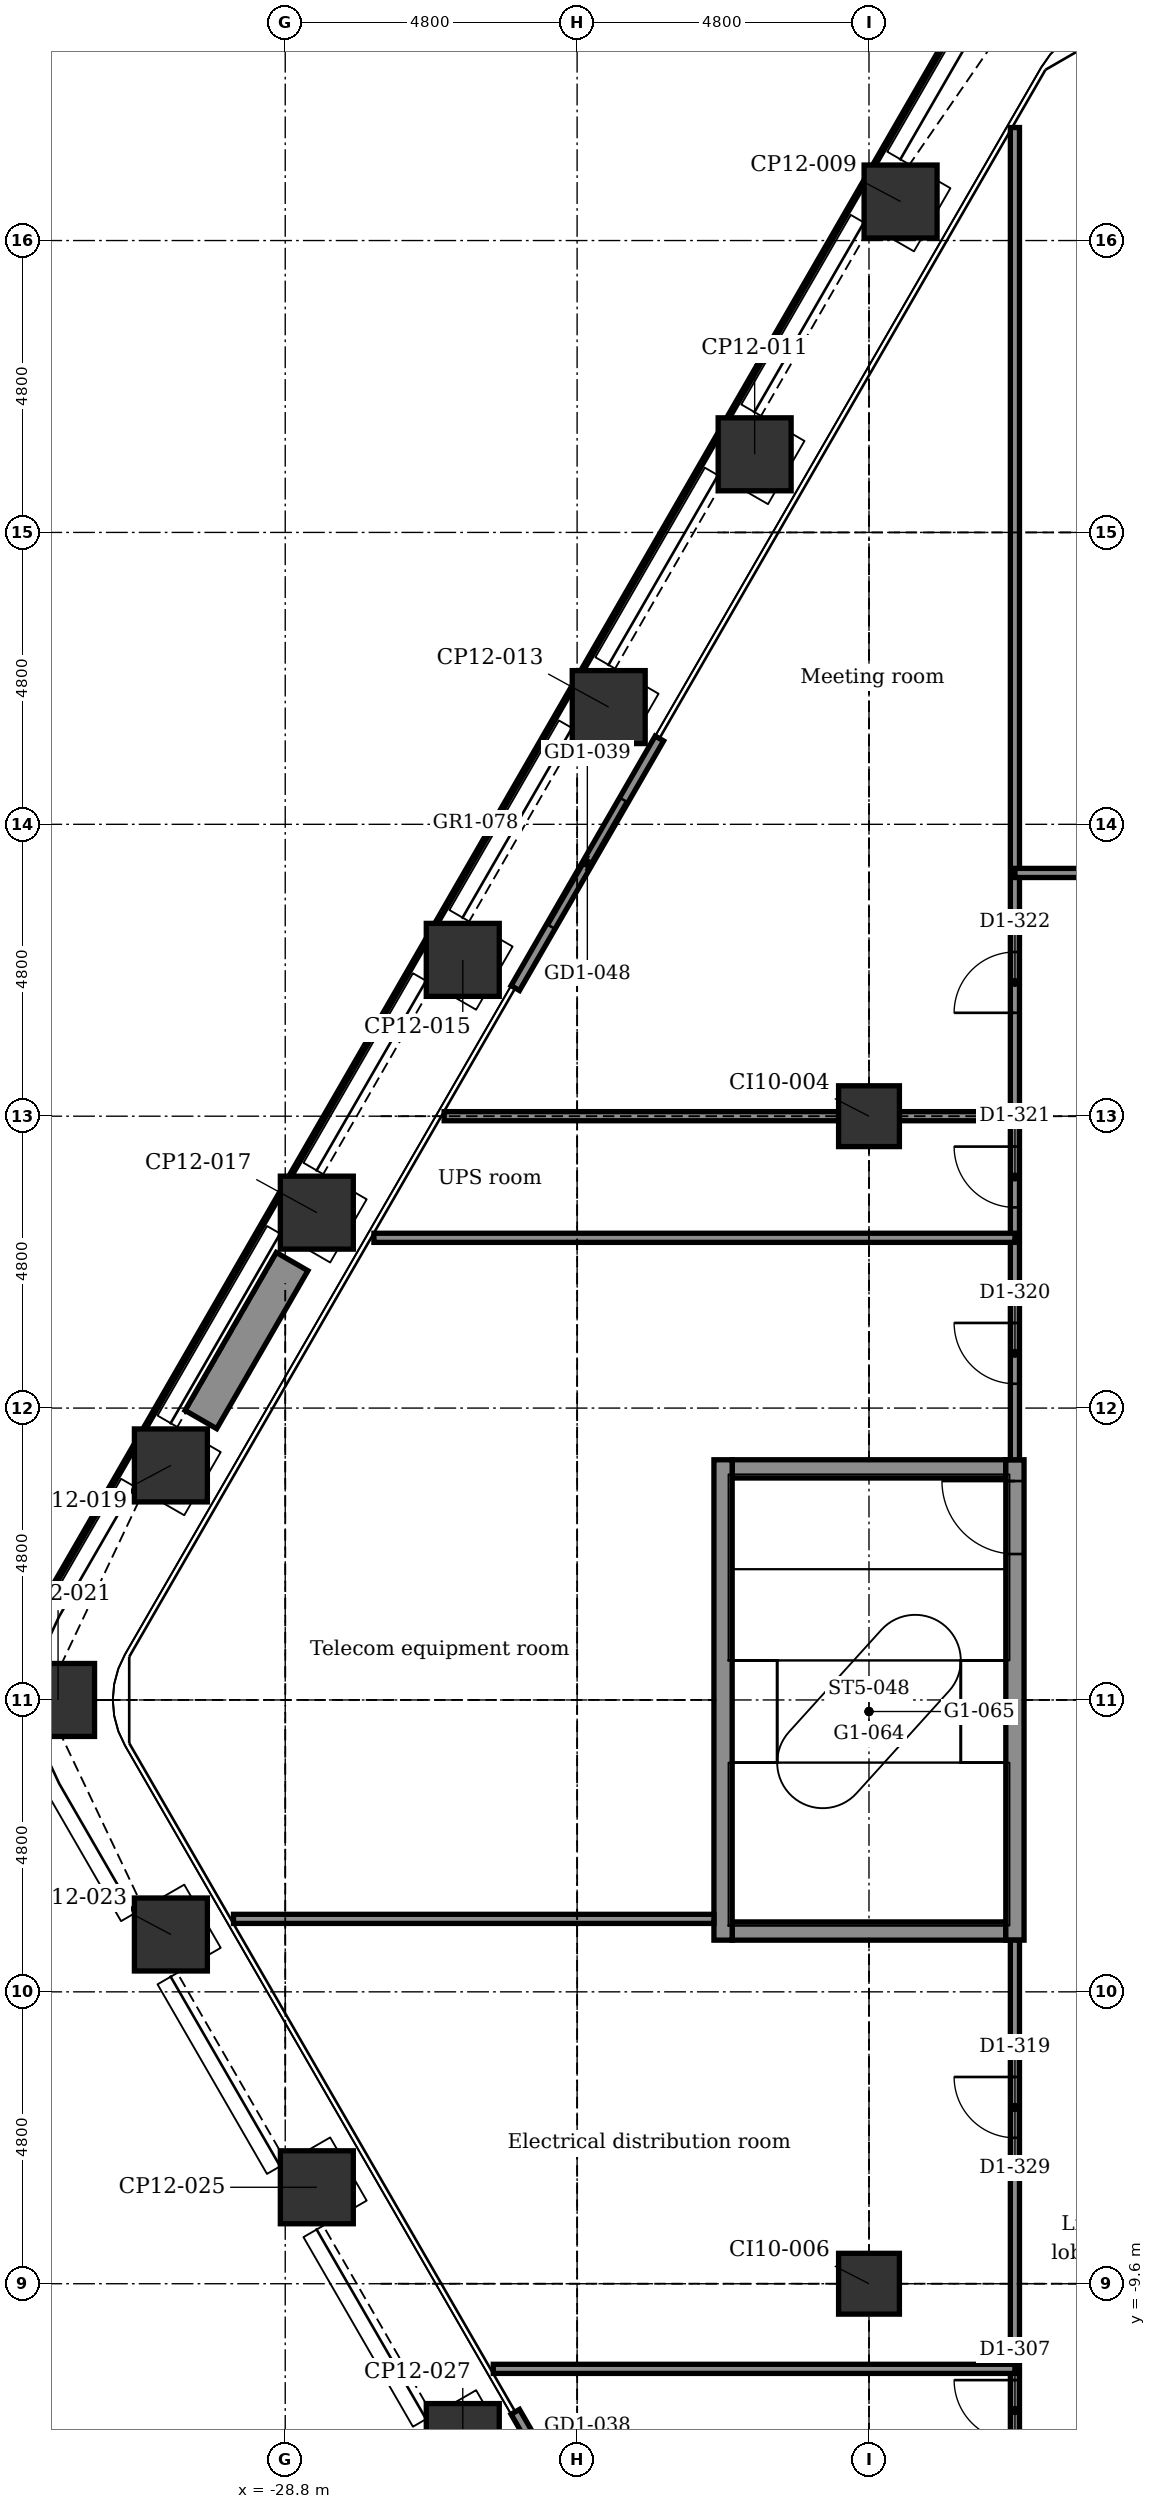
"""IFC4 building model, lengths in metres.
Left out: names, types, materials, properties, quantities, classifications, styles, units other than length and angle.
Written with IfcOpenShell. Run it as: python <this file> out.ifc"""

import sys

from ifc_helpers import new_model, si_unit, direction, frame, frame_2d, origin, origin_2d, place, context, subcontext, project, spatial, rectangle, extrude, element, fill, save


model = new_model("IFC4")
c1 = context("Model", 3, precision=1e-05, world=origin(), true_north=direction((0.0, 1.0)))
c2 = subcontext(c1, "Body", "Model", "MODEL_VIEW")
j1 = project(units=[si_unit("LENGTHUNIT", "METRE"), si_unit("PLANEANGLEUNIT", "RADIAN")], contexts=[c1])
p1 = place(None, origin())
s1 = spatial("IfcSite", under=j1, at=p1, CompositionType="ELEMENT")
p2 = place(p1, origin())
s2 = spatial("IfcBuilding", under=s1, at=p2, CompositionType="ELEMENT")
p3 = place(p2, frame((0.0, 0.0, 113.9)))
s3 = spatial("IfcBuildingStorey", under=s2, at=p3, CompositionType="ELEMENT", Elevation=113.9)
for number, where, z_axis, x_axis in (
    (1, (-25.88, -12.171, -0.2), (0.0, 0.0, 1.0), (0.866, 0.5, 0.0)),
    (2, (-28.28, -8.014, -0.2), (0.0, 0.0, 1.0), (0.866, 0.5, 0.0)),
    (3, (-30.68, -3.857, -0.2), (0.0, 0.0, 1.0), (0.866, 0.5, 0.0)),
    (4, (-32.536, 0.0, -0.2), (0.0, 0.0, 1.0), (1.0, 0.0, 0.0)),
    (5, (-30.68, 3.857, -0.2), (0.0, 0.0, 1.0), (0.5, 0.866, 0.0)),
    (6, (-28.28, 8.014, -0.2), (0.0, 0.0, 1.0), (0.5, 0.866, 0.0)),
    (7, (-25.88, 12.171, -0.2), (0.0, 0.0, 1.0), (0.5, 0.866, 0.0)),
    (8, (-23.48, 16.328, -0.2), (0.0, 0.0, 1.0), (0.5, 0.866, 0.0)),
    (9, (-21.08, 20.485, -0.2), (0.0, 0.0, 1.0), (0.5, 0.866, 0.0)),
    (10, (-18.68, 24.642, -0.2), (0.0, 0.0, 1.0), (0.5, 0.866, 0.0)),
):
    element("IfcColumn", number, at=place(p3, frame(where, z_axis=z_axis, x_axis=x_axis)), inside=s3, PredefinedType="COLUMN", context=c2, shape_type="SweptSolid", body=[
        extrude(rectangle(XDim=1.2, YDim=1.2, at=origin_2d()), origin(), (0.0, 0.0, 1.0), 4.5),
    ])
for number, where, z_axis, x_axis in (
    (11, (-19.2, -9.6, -0.2), (0.0, 0.0, 1.0), (1.0, 0.0, 0.0)),
    (12, (-19.2, 9.6, -0.2), (0.0, 0.0, 1.0), (1.0, 0.0, 0.0)),
):
    element("IfcColumn", number, at=place(p3, frame(where, z_axis=z_axis, x_axis=x_axis)), inside=s3, PredefinedType="COLUMN", context=c2, shape_type="SweptSolid", body=[
        extrude(rectangle(XDim=1.0, YDim=1.0, at=origin_2d()), origin(), (0.0, 0.0, 1.0), 4.5),
    ])
for number, where, z_axis, x_axis in (
    (13, (-21.45, -3.8, -0.2), (0.0, 0.0, 1.0), (1.0, 0.0, 0.0)),
    (14, (-21.45, 3.8, -0.2), (0.0, 0.0, 1.0), (1.0, 0.0, 0.0)),
):
    element("IfcWall", number, at=place(p3, frame(where, z_axis=z_axis, x_axis=x_axis)), inside=s3, PredefinedType="STANDARD", context=c2, shape_type="SweptSolid", body=[
        extrude(rectangle(XDim=4.5, YDim=0.3, at=frame_2d((2.25, 0.0))), origin(), (0.0, 0.0, 1.0), 4.5),
    ])
p4 = place(p3, frame((-21.6, -3.95, -0.2), z_axis=(0.0, 0.0, 1.0), x_axis=(0.0, 1.0, 0.0)))
e15 = element("IfcWall", 15, at=p4, inside=s3, PredefinedType="STANDARD", context=c2, shape_type="SweptSolid", body=[
    extrude(rectangle(XDim=7.9, YDim=0.3, at=frame_2d((3.95, 0.0))), origin(), (0.0, 0.0, 1.0), 4.5),
])
p5 = place(p3, frame((-16.8, -3.95, -0.2), z_axis=(0.0, 0.0, 1.0), x_axis=(0.0, 1.0, 0.0)))
e16 = element("IfcWall", 16, at=p5, inside=s3, PredefinedType="STANDARD", context=c2, shape_type="SweptSolid", body=[
    extrude(rectangle(XDim=7.9, YDim=0.3, at=frame_2d((3.95, 0.0))), origin(), (0.0, 0.0, 1.0), 4.5),
])
p6 = place(p5, frame((6.35, 0.0, 0.2)))
e17 = element("IfcOpeningElement", 17, at=p6, cuts=e16, PredefinedType="OPENING", context=c2, shape_type="SweptSolid", body=[
    extrude(rectangle(XDim=1.2, YDim=2.1, at=frame_2d((0.6, 1.05))), frame((0.0, 0.16, 0.0), z_axis=(0.0, -1.0, 0.0), x_axis=(1.0, 0.0, 0.0)), (0.0, 0.0, 1.0), 0.32),
])
p7 = place(p3, frame((-22.647, -15.812, 0.0), z_axis=(0.0, 0.0, 1.0), x_axis=(-0.499978080042, 0.866038058908, 0.0)))
e18 = element("IfcWall", 18, at=p7, inside=s3, PredefinedType="PARTITIONING", context=c2, shape_type="SweptSolid", body=[
    extrude(rectangle(XDim=4.74, YDim=0.16, at=frame_2d((2.37, 0.0))), origin(), (0.0, 0.0, 1.0), 4.3),
])
p8 = place(p7, frame((1.17, 0.0, 0.0)))
e19 = element("IfcOpeningElement", 19, at=p8, cuts=e18, PredefinedType="OPENING", context=c2, shape_type="SweptSolid", body=[
    extrude(rectangle(XDim=2.4, YDim=2.4, at=frame_2d((1.2, 1.2))), frame((0.0, 0.09, 0.0), z_axis=(0.0, -1.0, 0.0), x_axis=(1.0, 0.0, 0.0)), (0.0, 0.0, 1.0), 0.18),
])
p9 = place(p3, frame((-25.017, 11.707, 0.0), z_axis=(0.0, 0.0, 1.0), x_axis=(0.499978080042, 0.866038058908, 0.0)))
e20 = element("IfcWall", 20, at=p9, inside=s3, PredefinedType="PARTITIONING", context=c2, shape_type="SweptSolid", body=[
    extrude(rectangle(XDim=4.74, YDim=0.16, at=frame_2d((2.37, 0.0))), origin(), (0.0, 0.0, 1.0), 4.3),
])
p10 = place(p9, frame((1.17, 0.0, 0.0)))
e21 = element("IfcOpeningElement", 21, at=p10, cuts=e20, PredefinedType="OPENING", context=c2, shape_type="SweptSolid", body=[
    extrude(rectangle(XDim=2.4, YDim=2.4, at=frame_2d((1.2, 1.2))), frame((0.0, 0.09, 0.0), z_axis=(0.0, -1.0, 0.0), x_axis=(1.0, 0.0, 0.0)), (0.0, 0.0, 1.0), 0.18),
])
p11 = place(p3, frame((-30.187, 4.611, 0.0), z_axis=(0.0, 0.0, 1.0), x_axis=(0.499990139034, 0.866031096941, 0.0)))
e22 = element("IfcWall", 22, at=p11, inside=s3, PredefinedType="USERDEFINED", context=c2, shape_type="SweptSolid", body=[
    extrude(rectangle(XDim=3.0, YDim=0.6, at=frame_2d((1.5, 0.0))), origin(), (0.0, 0.0, 1.0), 0.7),
])
p12 = place(p3, frame((-16.8, -12.4, 0.0), z_axis=(0.0, 0.0, 1.0), x_axis=(0.0, 1.0, 0.0)))
e23 = element("IfcWall", 23, at=p12, inside=s3, PredefinedType="PARTITIONING", context=c2, shape_type="SweptSolid", body=[
    extrude(rectangle(XDim=8.45, YDim=0.15, at=frame_2d((4.225, 0.0))), origin(), (0.0, 0.0, 1.0), 4.3),
])
p13 = place(p12, frame((0.215, 0.0, 0.0)))
e24 = element("IfcOpeningElement", 24, at=p13, cuts=e23, PredefinedType="OPENING", context=c2, shape_type="SweptSolid", body=[
    extrude(rectangle(XDim=1.0, YDim=2.1, at=frame_2d((0.5, 1.05))), frame((0.0, 0.085, 0.0), z_axis=(0.0, -1.0, 0.0), x_axis=(1.0, 0.0, 0.0)), (0.0, 0.0, 1.0), 0.17),
])
p14 = place(p12, frame((5.2, 0.0, 0.0)))
e25 = element("IfcOpeningElement", 25, at=p14, cuts=e23, PredefinedType="OPENING", context=c2, shape_type="SweptSolid", body=[
    extrude(rectangle(XDim=1.0, YDim=2.1, at=frame_2d((0.5, 1.05))), frame((0.0, 0.085, 0.0), z_axis=(0.0, -1.0, 0.0), x_axis=(1.0, 0.0, 0.0)), (0.0, 0.0, 1.0), 0.17),
])
p15 = place(p3, frame((-16.8, 3.95, 0.0), z_axis=(0.0, 0.0, 1.0), x_axis=(0.0, 1.0, 0.0)))
e26 = element("IfcWall", 26, at=p15, inside=s3, PredefinedType="PARTITIONING", context=c2, shape_type="SweptSolid", body=[
    extrude(rectangle(XDim=21.908, YDim=0.15, at=frame_2d((10.954, 0.0))), origin(), (0.0, 0.0, 1.0), 4.3),
])
p16 = place(p15, frame((1.25, 0.0, 0.0)))
e27 = element("IfcOpeningElement", 27, at=p16, cuts=e26, PredefinedType="OPENING", context=c2, shape_type="SweptSolid", body=[
    extrude(rectangle(XDim=1.0, YDim=2.1, at=frame_2d((0.5, 1.05))), frame((0.0, 0.085, 0.0), z_axis=(0.0, -1.0, 0.0), x_axis=(1.0, 0.0, 0.0)), (0.0, 0.0, 1.0), 0.17),
])
p17 = place(p15, frame((4.15, 0.0, 0.0)))
e28 = element("IfcOpeningElement", 28, at=p17, cuts=e26, PredefinedType="OPENING", context=c2, shape_type="SweptSolid", body=[
    extrude(rectangle(XDim=1.0, YDim=2.1, at=frame_2d((0.5, 1.05))), frame((0.0, 0.085, 0.0), z_axis=(0.0, -1.0, 0.0), x_axis=(1.0, 0.0, 0.0)), (0.0, 0.0, 1.0), 0.17),
])
p18 = place(p15, frame((7.35, 0.0, 0.0)))
e29 = element("IfcOpeningElement", 29, at=p18, cuts=e26, PredefinedType="OPENING", context=c2, shape_type="SweptSolid", body=[
    extrude(rectangle(XDim=1.0, YDim=2.1, at=frame_2d((0.5, 1.05))), frame((0.0, 0.085, 0.0), z_axis=(0.0, -1.0, 0.0), x_axis=(1.0, 0.0, 0.0)), (0.0, 0.0, 1.0), 0.17),
])
p19 = place(p3, frame((-25.378, -11.0, 0.0), z_axis=(0.0, 0.0, 1.0), x_axis=(1.0, 0.0, 0.0)))
e30 = element("IfcWall", 30, at=p19, inside=s3, PredefinedType="PARTITIONING", context=c2, shape_type="SweptSolid", body=[
    extrude(rectangle(XDim=8.578, YDim=0.15, at=frame_2d((4.289, 0.0))), origin(), (0.0, 0.0, 1.0), 4.3),
])
p20 = place(p3, frame((-29.651, -3.6, 0.0), z_axis=(0.0, 0.0, 1.0), x_axis=(1.0, 0.0, 0.0)))
e31 = element("IfcWall", 31, at=p20, inside=s3, PredefinedType="PARTITIONING", context=c2, shape_type="SweptSolid", body=[
    extrude(rectangle(XDim=7.901, YDim=0.15, at=frame_2d((3.95, 0.0))), origin(), (0.0, 0.0, 1.0), 4.3),
])
p21 = place(p3, frame((-27.342, 7.6, 0.0), z_axis=(0.0, 0.0, 1.0), x_axis=(1.0, 0.0, 0.0)))
e32 = element("IfcWall", 32, at=p21, inside=s3, PredefinedType="PARTITIONING", context=c2, shape_type="SweptSolid", body=[
    extrude(rectangle(XDim=10.542, YDim=0.15, at=frame_2d((5.271, 0.0))), origin(), (0.0, 0.0, 1.0), 4.3),
])
p22 = place(p3, frame((-26.187, 9.6, 0.0), z_axis=(0.0, 0.0, 1.0), x_axis=(1.0, 0.0, 0.0)))
e33 = element("IfcWall", 33, at=p22, inside=s3, PredefinedType="PARTITIONING", context=c2, shape_type="SweptSolid", body=[
    extrude(rectangle(XDim=6.487, YDim=0.15, at=frame_2d((3.243, 0.0))), origin(), (0.0, 0.0, 1.0), 3.692),
])
p23 = place(p3, frame((-18.7, 9.6, 0.0), z_axis=(0.0, 0.0, 1.0), x_axis=(1.0, 0.0, 0.0)))
e34 = element("IfcWall", 34, at=p23, inside=s3, PredefinedType="PARTITIONING", context=c2, shape_type="SweptSolid", body=[
    extrude(rectangle(XDim=1.9, YDim=0.15, at=frame_2d((0.95, 0.0))), origin(), (0.0, 0.0, 1.0), 3.692),
])
p24 = place(p3, frame((-16.8, 13.6, 0.0), z_axis=(0.0, 0.0, 1.0), x_axis=(1.0, 0.0, 0.0)))
e35 = element("IfcWall", 35, at=p24, inside=s3, PredefinedType="PARTITIONING", context=c2, shape_type="SweptSolid", body=[
    extrude(rectangle(XDim=33.6, YDim=0.15, at=frame_2d((16.8, 0.0))), origin(), (0.0, 0.0, 1.0), 4.3),
])
p25 = place(p24, frame((3.1, 0.0, 0.0)))
e36 = element("IfcOpeningElement", 36, at=p25, cuts=e35, PredefinedType="OPENING", context=c2, shape_type="SweptSolid", body=[
    extrude(rectangle(XDim=1.0, YDim=2.1, at=frame_2d((0.5, 1.05))), frame((0.0, 0.085, 0.0), z_axis=(0.0, -1.0, 0.0), x_axis=(1.0, 0.0, 0.0)), (0.0, 0.0, 1.0), 0.17),
])
p26 = place(p24, frame((9.1, 0.0, 0.0)))
e37 = element("IfcOpeningElement", 37, at=p26, cuts=e35, PredefinedType="OPENING", context=c2, shape_type="SweptSolid", body=[
    extrude(rectangle(XDim=1.0, YDim=2.1, at=frame_2d((0.5, 1.05))), frame((0.0, 0.085, 0.0), z_axis=(0.0, -1.0, 0.0), x_axis=(1.0, 0.0, 0.0)), (0.0, 0.0, 1.0), 0.17),
])
p27 = place(p24, frame((13.9, 0.0, 0.0)))
e38 = element("IfcOpeningElement", 38, at=p27, cuts=e35, PredefinedType="OPENING", context=c2, shape_type="SweptSolid", body=[
    extrude(rectangle(XDim=1.0, YDim=2.1, at=frame_2d((0.5, 1.05))), frame((0.0, 0.085, 0.0), z_axis=(0.0, -1.0, 0.0), x_axis=(1.0, 0.0, 0.0)), (0.0, 0.0, 1.0), 0.17),
])
p28 = place(p24, frame((18.7, 0.0, 0.0)))
e39 = element("IfcOpeningElement", 39, at=p28, cuts=e35, PredefinedType="OPENING", context=c2, shape_type="SweptSolid", body=[
    extrude(rectangle(XDim=1.0, YDim=2.1, at=frame_2d((0.5, 1.05))), frame((0.0, 0.085, 0.0), z_axis=(0.0, -1.0, 0.0), x_axis=(1.0, 0.0, 0.0)), (0.0, 0.0, 1.0), 0.17),
])
p29 = place(p24, frame((23.5, 0.0, 0.0)))
e40 = element("IfcOpeningElement", 40, at=p29, cuts=e35, PredefinedType="OPENING", context=c2, shape_type="SweptSolid", body=[
    extrude(rectangle(XDim=1.0, YDim=2.1, at=frame_2d((0.5, 1.05))), frame((0.0, 0.085, 0.0), z_axis=(0.0, -1.0, 0.0), x_axis=(1.0, 0.0, 0.0)), (0.0, 0.0, 1.0), 0.17),
])
p30 = place(p24, frame((29.5, 0.0, 0.0)))
e41 = element("IfcOpeningElement", 41, at=p30, cuts=e35, PredefinedType="OPENING", context=c2, shape_type="SweptSolid", body=[
    extrude(rectangle(XDim=1.0, YDim=2.1, at=frame_2d((0.5, 1.05))), frame((0.0, 0.085, 0.0), z_axis=(0.0, -1.0, 0.0), x_axis=(1.0, 0.0, 0.0)), (0.0, 0.0, 1.0), 0.17),
])
p31 = place(p10, origin())
e42 = element("IfcDoor", 42, at=p31, inside=s3, OperationType="DOUBLE_DOOR_SLIDING", PredefinedType="DOOR", context=c2, shape_type="SweptSolid", body=[
    extrude(rectangle(XDim=2.4, YDim=2.4, at=frame_2d((1.2, 1.2))), frame((0.0, 0.025, 0.0), z_axis=(0.0, -1.0, 0.0), x_axis=(1.0, 0.0, 0.0)), (0.0, 0.0, 1.0), 0.05),
])
fill(e21, e42)
p32 = place(p13, origin())
e43 = element("IfcDoor", 43, at=p32, inside=s3, OperationType="SINGLE_SWING_RIGHT", PredefinedType="DOOR", context=c2, shape_type="SweptSolid", body=[
    extrude(rectangle(XDim=1.0, YDim=2.1, at=frame_2d((0.5, 1.05))), frame((0.0, 0.025, 0.0), z_axis=(0.0, -1.0, 0.0), x_axis=(1.0, 0.0, 0.0)), (0.0, 0.0, 1.0), 0.05),
])
fill(e24, e43)
p33 = place(p14, origin())
e44 = element("IfcDoor", 44, at=p33, inside=s3, OperationType="SINGLE_SWING_RIGHT", PredefinedType="DOOR", context=c2, shape_type="SweptSolid", body=[
    extrude(rectangle(XDim=1.0, YDim=2.1, at=frame_2d((0.5, 1.05))), frame((0.0, 0.025, 0.0), z_axis=(0.0, -1.0, 0.0), x_axis=(1.0, 0.0, 0.0)), (0.0, 0.0, 1.0), 0.05),
])
fill(e25, e44)
p34 = place(p16, origin())
e45 = element("IfcDoor", 45, at=p34, inside=s3, OperationType="SINGLE_SWING_RIGHT", PredefinedType="DOOR", context=c2, shape_type="SweptSolid", body=[
    extrude(rectangle(XDim=1.0, YDim=2.1, at=frame_2d((0.5, 1.05))), frame((0.0, 0.025, 0.0), z_axis=(0.0, -1.0, 0.0), x_axis=(1.0, 0.0, 0.0)), (0.0, 0.0, 1.0), 0.05),
])
fill(e27, e45)
p35 = place(p17, origin())
e46 = element("IfcDoor", 46, at=p35, inside=s3, OperationType="SINGLE_SWING_RIGHT", PredefinedType="DOOR", context=c2, shape_type="SweptSolid", body=[
    extrude(rectangle(XDim=1.0, YDim=2.1, at=frame_2d((0.5, 1.05))), frame((0.0, 0.025, 0.0), z_axis=(0.0, -1.0, 0.0), x_axis=(1.0, 0.0, 0.0)), (0.0, 0.0, 1.0), 0.05),
])
fill(e28, e46)
p36 = place(p18, origin())
e47 = element("IfcDoor", 47, at=p36, inside=s3, OperationType="SINGLE_SWING_LEFT", PredefinedType="DOOR", context=c2, shape_type="SweptSolid", body=[
    extrude(rectangle(XDim=1.0, YDim=2.1, at=frame_2d((0.5, 1.05))), frame((0.0, 0.025, 0.0), z_axis=(0.0, -1.0, 0.0), x_axis=(1.0, 0.0, 0.0)), (0.0, 0.0, 1.0), 0.05),
])
fill(e29, e47)
p37 = place(p6, origin())
e48 = element("IfcDoor", 48, at=p37, inside=s3, OperationType="SINGLE_SWING_RIGHT", PredefinedType="DOOR", context=c2, shape_type="SweptSolid", body=[
    extrude(rectangle(XDim=1.2, YDim=2.1, at=frame_2d((0.6, 1.05))), frame((0.0, 0.025, 0.0), z_axis=(0.0, -1.0, 0.0), x_axis=(1.0, 0.0, 0.0)), (0.0, 0.0, 1.0), 0.05),
])
fill(e17, e48)
save(model, sys.argv[1])
